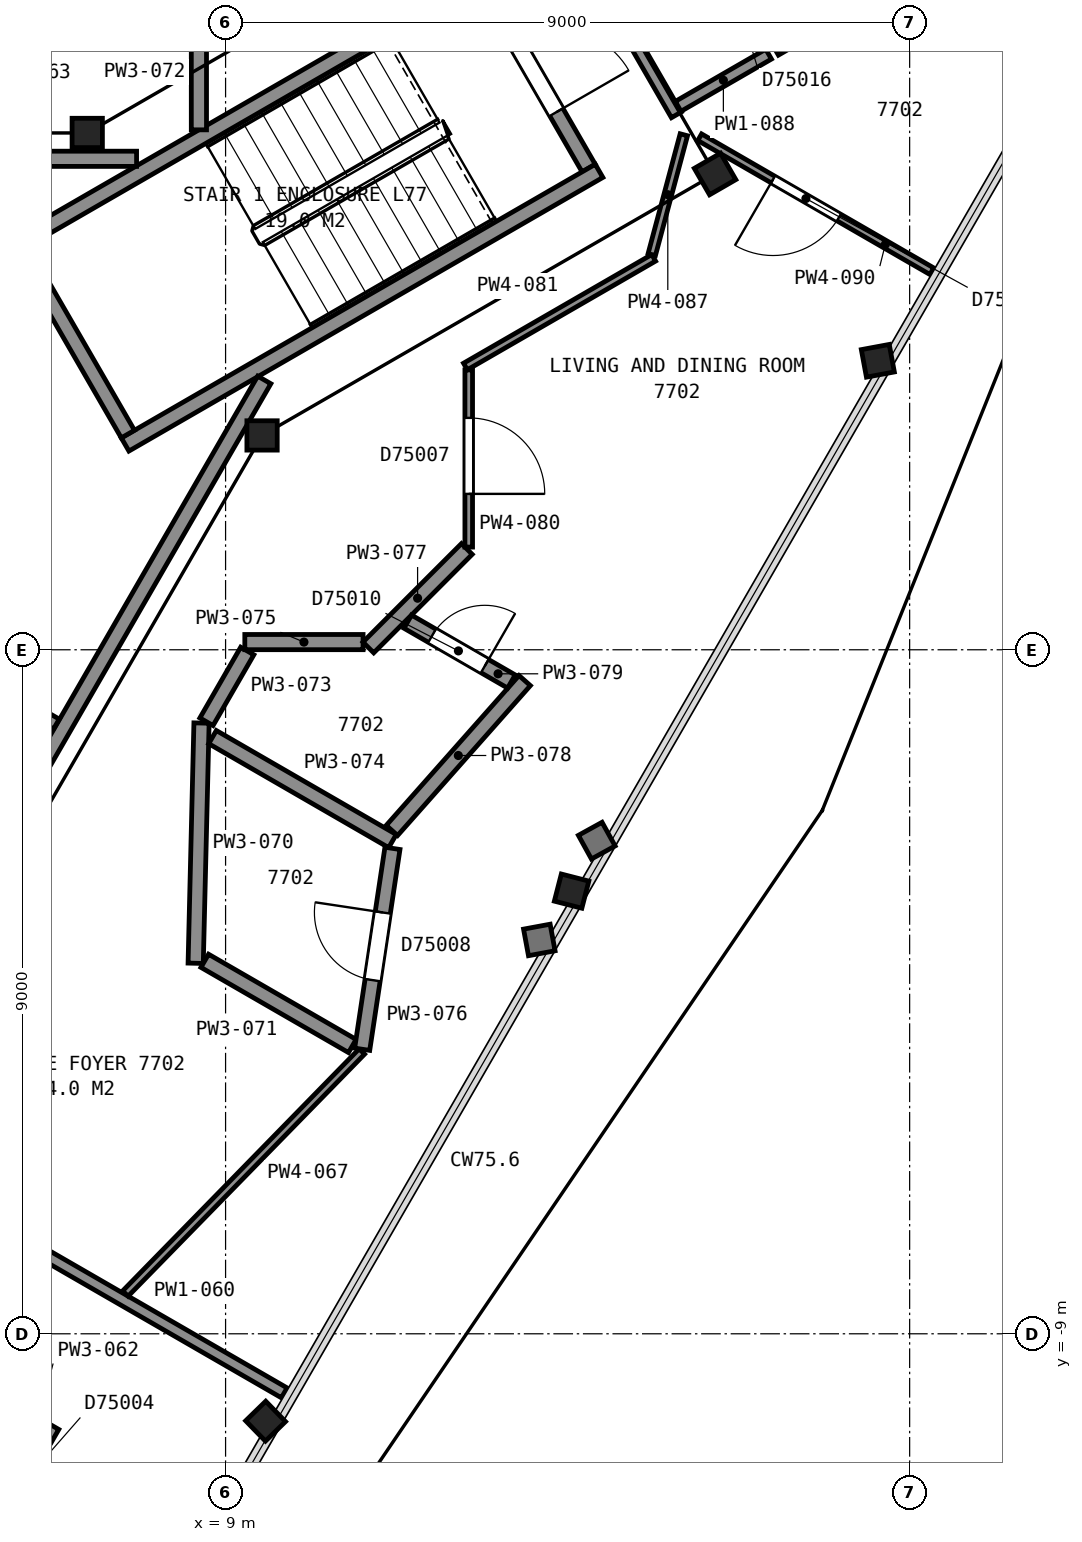
"""IFC4 building model, lengths in metres.
Left out: names, types, materials, properties, quantities, classifications, styles, units other than length and angle.
Written with IfcOpenShell. Run it as: python <this file> out.ifc"""

import sys

from ifc_helpers import new_model, si_unit, direction, frame, frame_2d, origin, origin_2d, place, context, subcontext, project, spatial, rectangle, i_section, extrude, element, fill, save


model = new_model("IFC4")
c1 = context("Model", 3, precision=1e-05, world=origin(), true_north=direction((0.0, 1.0)))
c2 = subcontext(c1, "Body", "Model", "MODEL_VIEW")
j1 = project(units=[si_unit("LENGTHUNIT", "METRE"), si_unit("PLANEANGLEUNIT", "RADIAN")], contexts=[c1])
p1 = place(None, origin())
s1 = spatial("IfcSite", under=j1, at=p1, CompositionType="ELEMENT")
p2 = place(p1, origin())
s2 = spatial("IfcBuilding", under=s1, at=p2, CompositionType="ELEMENT")
p3 = place(p2, frame((0.0, 0.0, 304.7)))
s3 = spatial("IfcBuildingStorey", under=s2, at=p3, CompositionType="ELEMENT", Elevation=304.7)
p4 = place(p3, frame((9.751, -10.381, 0.045), z_axis=(-0.187414704281, 0.192691239229, 0.963195626518), x_axis=(-0.498724706912, -0.863448717299, 0.075696626808)))
e1 = element("IfcColumn", 1, at=p4, inside=s3, PredefinedType="COLUMN", context=c2, shape_type="SweptSolid", body=[
    extrude(i_section(OverallWidth=0.373, OverallDepth=0.368, WebThickness=0.015, FlangeThickness=0.024, FilletRadius=0.015, at=origin_2d()), origin(), (0.0, 0.0, 1.0), 3.748),
])
p5 = place(p3, frame((13.868, -3.257, 0.045), z_axis=(-0.262724220884, 0.067633911174, 0.96249760406), x_axis=(-0.498583237787, -0.86355528035, -0.075412417924)))
e2 = element("IfcColumn", 2, at=p5, inside=s3, PredefinedType="COLUMN", context=c2, shape_type="SweptSolid", body=[
    extrude(i_section(OverallWidth=0.373, OverallDepth=0.368, WebThickness=0.015, FlangeThickness=0.024, FilletRadius=0.015, at=origin_2d()), origin(), (0.0, 0.0, 1.0), 3.75),
])
p6 = place(p3, frame((17.981, 3.876, 0.055), z_axis=(-0.328547208417, -0.061145929932, 0.942506184115), x_axis=(-0.48718313333, -0.843929861769, -0.224577343052)))
e3 = element("IfcColumn", 3, at=p6, inside=s3, PredefinedType="COLUMN", context=c2, shape_type="SweptSolid", body=[
    extrude(i_section(OverallWidth=0.373, OverallDepth=0.368, WebThickness=0.015, FlangeThickness=0.024, FilletRadius=0.015, at=origin_2d()), origin(), (0.0, 0.0, 1.0), 3.809),
])
p7 = place(p3, frame((9.48, 2.82, 0.0), z_axis=(0.0, 0.0, 1.0), x_axis=(1.0, 0.0, 0.0)))
e4 = element("IfcColumn", 4, at=p7, inside=s3, PredefinedType="COLUMN", context=c2, shape_type="SweptSolid", body=[
    extrude(i_section(OverallWidth=0.399, OverallDepth=0.386, WebThickness=0.021, FlangeThickness=0.033, FilletRadius=0.015, at=origin_2d()), origin(), (0.0, 0.0, 1.0), 3.7),
])
p8 = place(p3, frame((15.44, 6.26, 0.0), z_axis=(0.0, 0.0, 1.0), x_axis=(0.5, -0.866025403784, 0.0)))
e5 = element("IfcColumn", 5, at=p8, inside=s3, PredefinedType="COLUMN", context=c2, shape_type="SweptSolid", body=[
    extrude(i_section(OverallWidth=0.401, OverallDepth=0.399, WebThickness=0.025, FlangeThickness=0.04, FilletRadius=0.015, at=origin_2d()), origin(), (0.0, 0.0, 1.0), 3.7),
])
p9 = place(p3, frame((7.18, 6.8, 0.0), z_axis=(0.0, 0.0, 1.0), x_axis=(1.0, 0.0, 0.0)))
e6 = element("IfcColumn", 6, at=p9, inside=s3, PredefinedType="COLUMN", context=c2, shape_type="SweptSolid", body=[
    extrude(i_section(OverallWidth=0.399, OverallDepth=0.386, WebThickness=0.021, FlangeThickness=0.033, FilletRadius=0.015, at=origin_2d()), origin(), (0.0, 0.0, 1.0), 3.7),
])
p10 = place(p3, frame((13.777, 6.338, 0.0), z_axis=(0.0, 0.0, 1.0), x_axis=(-0.500049511043, 0.865996816683, 0.0)))
e7 = element("IfcWall", 7, at=p10, inside=s3, PredefinedType="PARTITIONING", context=c2, shape_type="SweptSolid", body=[
    extrude(rectangle(XDim=2.8, YDim=0.2, at=frame_2d((1.4, 0.0))), origin(), (0.0, 0.0, 1.0), 3.45),
])
p11 = place(p10, frame((0.85, 0.0, 0.0)))
e8 = element("IfcOpeningElement", 8, at=p11, cuts=e7, PredefinedType="OPENING", context=c2, shape_type="SweptSolid", body=[
    extrude(rectangle(XDim=1.1, YDim=2.1, at=frame_2d((0.55, 1.05))), frame((0.0, 0.11, 0.0), z_axis=(0.0, -1.0, 0.0), x_axis=(1.0, 0.0, 0.0)), (0.0, 0.0, 1.0), 0.22),
])
for number, where, z_axis, x_axis in (
    (9, (6.178, 5.299, 0.0), (0.0, 0.0, 1.0), (0.866, 0.5, 0.0)),
    (10, (7.678, 2.701, 0.0), (0.0, 0.0, 1.0), (0.866, 0.5, 0.0)),
):
    element("IfcWall", number, at=place(p3, frame(where, z_axis=z_axis, x_axis=x_axis)), inside=s3, PredefinedType="PARTITIONING", context=c2, shape_type="SweptSolid", body=[
        extrude(rectangle(XDim=7.2, YDim=0.2, at=frame_2d((3.6, 0.0))), origin(), (0.0, 0.0, 1.0), 3.45),
    ])
p12 = place(p3, frame((7.715, 2.838, 0.0), z_axis=(0.0, 0.0, 1.0), x_axis=(-0.500049511043, 0.865996816683, 0.0)))
e11 = element("IfcWall", 11, at=p12, inside=s3, PredefinedType="PARTITIONING", context=c2, shape_type="SweptSolid", body=[
    extrude(rectangle(XDim=2.8, YDim=0.2, at=frame_2d((1.4, 0.0))), origin(), (0.0, 0.0, 1.0), 3.45),
])
p13 = place(p3, frame((7.829, 6.46, 0.0), z_axis=(0.0, 0.0, 1.0), x_axis=(-1.0, 0.0, 0.0)))
e12 = element("IfcWall", 12, at=p13, inside=s3, PredefinedType="PARTITIONING", context=c2, shape_type="SweptSolid", body=[
    extrude(rectangle(XDim=15.658, YDim=0.2, at=frame_2d((7.829, 0.0))), origin(), (0.0, 0.0, 1.0), 3.45),
])
p14 = place(p13, frame((12.168, 0.0, 0.0)))
e13 = element("IfcOpeningElement", 13, at=p14, cuts=e12, PredefinedType="OPENING", context=c2, shape_type="SweptSolid", body=[
    extrude(rectangle(XDim=1.2, YDim=2.1, at=frame_2d((0.6, 1.05))), frame((0.0, 0.11, 0.0), z_axis=(0.0, -1.0, 0.0), x_axis=(1.0, 0.0, 0.0)), (0.0, 0.0, 1.0), 0.22),
])
p15 = place(p3, frame((3.828, -6.29, 0.0), z_axis=(0.0, 0.0, 1.0), x_axis=(0.499979739078, 0.866037101117, 0.0)))
e14 = element("IfcWall", 14, at=p15, inside=s3, PredefinedType="PARTITIONING", context=c2, shape_type="SweptSolid", body=[
    extrude(rectangle(XDim=11.363, YDim=0.2, at=frame_2d((5.681, 0.0))), origin(), (0.0, 0.0, 1.0), 3.45),
])
p16 = place(p15, frame((0.55, 0.0, 0.0)))
e15 = element("IfcOpeningElement", 15, at=p16, cuts=e14, PredefinedType="OPENING", context=c2, shape_type="SweptSolid", body=[
    extrude(rectangle(XDim=1.2, YDim=2.1, at=frame_2d((0.6, 1.05))), frame((0.0, 0.11, 0.0), z_axis=(0.0, -1.0, 0.0), x_axis=(1.0, 0.0, 0.0)), (0.0, 0.0, 1.0), 0.22),
])
p17 = place(p3, frame((6.774, -0.978, 0.0), z_axis=(0.0, 0.0, 1.0), x_axis=(-0.866062920605, 0.499935013329, 0.0)))
e16 = element("IfcWall", 16, at=p17, inside=s3, PredefinedType="PARTITIONING", context=c2, shape_type="SweptSolid", body=[
    extrude(rectangle(XDim=2.22, YDim=0.15, at=frame_2d((1.11, 0.0))), origin(), (0.0, 0.0, 1.0), 3.45),
])
p18 = place(p17, frame((0.646, 0.0, 0.0)))
e17 = element("IfcOpeningElement", 17, at=p18, cuts=e16, PredefinedType="OPENING", context=c2, shape_type="SweptSolid", body=[
    extrude(rectangle(XDim=0.9, YDim=2.1, at=frame_2d((0.45, 1.05))), frame((0.0, 0.085, 0.0), z_axis=(0.0, -1.0, 0.0), x_axis=(1.0, 0.0, 0.0)), (0.0, 0.0, 1.0), 0.17),
])
p19 = place(p3, frame((3.682, -8.571, 0.0), z_axis=(0.0, 0.0, 1.0), x_axis=(0.866075604562, -0.499913039621, 0.0)))
e18 = element("IfcWall", 18, at=p19, inside=s3, PredefinedType="PARTITIONING", context=c2, shape_type="SweptSolid", body=[
    extrude(rectangle(XDim=3.549, YDim=0.2, at=frame_2d((1.774, 0.0))), origin(), (0.0, 0.0, 1.0), 2.723),
])
p20 = place(p3, frame((9.772, -9.777, 0.0), z_axis=(0.0, 0.0, 1.0), x_axis=(-0.866083818164, 0.499898809675, 0.0)))
e19 = element("IfcWall", 19, at=p20, inside=s3, PredefinedType="PARTITIONING", context=c2, shape_type="SweptSolid", body=[
    extrude(rectangle(XDim=6.551, YDim=0.15, at=frame_2d((3.275, 0.0))), origin(), (0.0, 0.0, 1.0), 2.723),
])
p21 = place(p20, frame((4.001, 0.0, 0.0)))
e20 = element("IfcOpeningElement", 20, at=p21, cuts=e19, PredefinedType="OPENING", context=c2, shape_type="SweptSolid", body=[
    extrude(rectangle(XDim=1.0, YDim=2.1, at=frame_2d((0.5, 1.05))), frame((0.0, 0.085, 0.0), z_axis=(0.0, -1.0, 0.0), x_axis=(1.0, 0.0, 0.0)), (0.0, 0.0, 1.0), 0.17),
])
p22 = place(p3, frame((7.682, -8.47, 0.0), z_axis=(0.0, 0.0, 1.0), x_axis=(0.698777378461, 0.715339203002, 0.0)))
e21 = element("IfcWall", 21, at=p22, inside=s3, PredefinedType="PARTITIONING", context=c2, shape_type="SweptSolid", body=[
    extrude(rectangle(XDim=4.452, YDim=0.1, at=frame_2d((2.226, 0.0))), origin(), (0.0, 0.0, 1.0), 2.723),
])
p23 = place(p3, frame((8.607, -4.125, 0.0), z_axis=(0.0, 0.0, 1.0), x_axis=(0.024245593124, 0.999706032399, 0.0)))
e22 = element("IfcWall", 22, at=p23, inside=s3, PredefinedType="PARTITIONING", context=c2, shape_type="SweptSolid", body=[
    extrude(rectangle(XDim=3.162, YDim=0.2, at=frame_2d((1.581, 0.0))), origin(), (0.0, 0.0, 1.0), 2.723),
])
p24 = place(p3, frame((8.726, -4.093, 0.0), z_axis=(0.0, 0.0, 1.0), x_axis=(0.866056839033, -0.499945548598, 0.0)))
e23 = element("IfcWall", 23, at=p24, inside=s3, PredefinedType="PARTITIONING", context=c2, shape_type="SweptSolid", body=[
    extrude(rectangle(XDim=2.242, YDim=0.2, at=frame_2d((1.121, 0.0))), origin(), (0.0, 0.0, 1.0), 2.723),
])
p25 = place(p3, frame((8.649, 6.841, 0.0), z_axis=(0.0, 0.0, 1.0), x_axis=(0.0, 1.0, 0.0)))
e24 = element("IfcWall", 24, at=p25, inside=s3, PredefinedType="PARTITIONING", context=c2, shape_type="SweptSolid", body=[
    extrude(rectangle(XDim=1.528, YDim=0.2, at=frame_2d((0.764, 0.0))), origin(), (0.0, 0.0, 1.0), 2.723),
])
p26 = place(p3, frame((8.749, -0.947, 0.0), z_axis=(0.0, 0.0, 1.0), x_axis=(0.499656913366, 0.866223394354, 0.0)))
e25 = element("IfcWall", 25, at=p26, inside=s3, PredefinedType="PARTITIONING", context=c2, shape_type="SweptSolid", body=[
    extrude(rectangle(XDim=1.075, YDim=0.2, at=frame_2d((0.538, 0.0))), origin(), (0.0, 0.0, 1.0), 2.723),
])
p27 = place(p3, frame((8.828, -1.149, 0.0), z_axis=(0.0, 0.0, 1.0), x_axis=(0.865853899269, -0.50029693695, 0.0)))
e26 = element("IfcWall", 26, at=p27, inside=s3, PredefinedType="PARTITIONING", context=c2, shape_type="SweptSolid", body=[
    extrude(rectangle(XDim=2.734, YDim=0.2, at=frame_2d((1.367, 0.0))), origin(), (0.0, 0.0, 1.0), 2.723),
])
p28 = place(p3, frame((9.253, 0.101, 0.0), z_axis=(0.0, 0.0, 1.0), x_axis=(1.0, 0.0, 0.0)))
e27 = element("IfcWall", 27, at=p28, inside=s3, PredefinedType="PARTITIONING", context=c2, shape_type="SweptSolid", body=[
    extrude(rectangle(XDim=1.556, YDim=0.2, at=frame_2d((0.778, 0.0))), origin(), (0.0, 0.0, 1.0), 2.723),
])
p29 = place(p3, frame((10.797, -5.256, 0.0), z_axis=(0.0, 0.0, 1.0), x_axis=(0.148961207986, 0.988843040384, 0.0)))
e28 = element("IfcWall", 28, at=p29, inside=s3, PredefinedType="PARTITIONING", context=c2, shape_type="SweptSolid", body=[
    extrude(rectangle(XDim=2.673, YDim=0.2, at=frame_2d((1.336, 0.0))), origin(), (0.0, 0.0, 1.0), 2.723),
])
p30 = place(p29, frame((0.92, 0.0, 0.0)))
e29 = element("IfcOpeningElement", 29, at=p30, cuts=e28, PredefinedType="OPENING", context=c2, shape_type="SweptSolid", body=[
    extrude(rectangle(XDim=0.9, YDim=2.1, at=frame_2d((0.45, 1.05))), frame((0.0, 0.11, 0.0), z_axis=(0.0, -1.0, 0.0), x_axis=(1.0, 0.0, 0.0)), (0.0, 0.0, 1.0), 0.22),
])
p31 = place(p3, frame((10.878, 0.03, 0.0), z_axis=(0.0, 0.0, 1.0), x_axis=(0.707173379423, 0.707040176677, 0.0)))
e30 = element("IfcWall", 30, at=p31, inside=s3, PredefinedType="PARTITIONING", context=c2, shape_type="SweptSolid", body=[
    extrude(rectangle(XDim=1.833, YDim=0.2, at=frame_2d((0.917, 0.0))), origin(), (0.0, 0.0, 1.0), 2.723),
])
p32 = place(p3, frame((11.188, -2.377, 0.0), z_axis=(0.0, 0.0, 1.0), x_axis=(0.663045631266, 0.748578981043, 0.0)))
e31 = element("IfcWall", 31, at=p32, inside=s3, PredefinedType="PARTITIONING", context=c2, shape_type="SweptSolid", body=[
    extrude(rectangle(XDim=2.635, YDim=0.2, at=frame_2d((1.317, 0.0))), origin(), (0.0, 0.0, 1.0), 2.723),
])
p33 = place(p3, frame((12.761, -0.417, 0.0), z_axis=(0.0, 0.0, 1.0), x_axis=(-0.866030680601, 0.499990860175, 0.0)))
e32 = element("IfcWall", 32, at=p33, inside=s3, PredefinedType="PARTITIONING", context=c2, shape_type="SweptSolid", body=[
    extrude(rectangle(XDim=1.575, YDim=0.2, at=frame_2d((0.787, 0.0))), origin(), (0.0, 0.0, 1.0), 2.723),
])
p34 = place(p33, frame((0.405, 0.0, 0.0)))
e33 = element("IfcOpeningElement", 33, at=p34, cuts=e32, PredefinedType="OPENING", context=c2, shape_type="SweptSolid", body=[
    extrude(rectangle(XDim=0.8, YDim=2.1, at=frame_2d((0.4, 1.05))), frame((0.0, 0.11, 0.0), z_axis=(0.0, -1.0, 0.0), x_axis=(1.0, 0.0, 0.0)), (0.0, 0.0, 1.0), 0.22),
])
p35 = place(p3, frame((12.199, 3.682, 0.0), z_axis=(0.0, 0.0, 1.0), x_axis=(0.0, -1.0, 0.0)))
e34 = element("IfcWall", 34, at=p35, inside=s3, PredefinedType="PARTITIONING", context=c2, shape_type="SweptSolid", body=[
    extrude(rectangle(XDim=2.331, YDim=0.1, at=frame_2d((1.166, 0.0))), origin(), (0.0, 0.0, 1.0), 2.723),
])
p36 = place(p35, frame((0.631, 0.0, 0.0)))
e35 = element("IfcOpeningElement", 35, at=p36, cuts=e34, PredefinedType="OPENING", context=c2, shape_type="SweptSolid", body=[
    extrude(rectangle(XDim=1.0, YDim=2.1, at=frame_2d((0.5, 1.05))), frame((0.0, 0.06, 0.0), z_axis=(0.0, -1.0, 0.0), x_axis=(1.0, 0.0, 0.0)), (0.0, 0.0, 1.0), 0.12),
])
p37 = place(p3, frame((12.156, 3.727, 0.0), z_axis=(0.0, 0.0, 1.0), x_axis=(0.866012137121, 0.500022977831, 0.0)))
e36 = element("IfcWall", 36, at=p37, inside=s3, PredefinedType="PARTITIONING", context=c2, shape_type="SweptSolid", body=[
    extrude(rectangle(XDim=2.86, YDim=0.1, at=frame_2d((1.43, 0.0))), origin(), (0.0, 0.0, 1.0), 2.723),
])
p38 = place(p3, frame((13.759, 9.069, 0.0), z_axis=(0.0, 0.0, 1.0), x_axis=(0.500046885369, -0.865998332812, 0.0)))
e37 = element("IfcWall", 37, at=p38, inside=s3, PredefinedType="PARTITIONING", context=c2, shape_type="SweptSolid", body=[
    extrude(rectangle(XDim=2.345, YDim=0.15, at=frame_2d((1.172, 0.0))), origin(), (0.0, 0.0, 1.0), 2.723),
])
p39 = place(p3, frame((14.607, 5.2, 0.0), z_axis=(0.0, 0.0, 1.0), x_axis=(0.258519214507, 0.966006115783, 0.0)))
e38 = element("IfcWall", 38, at=p39, inside=s3, PredefinedType="PARTITIONING", context=c2, shape_type="SweptSolid", body=[
    extrude(rectangle(XDim=1.632, YDim=0.1, at=frame_2d((0.816, 0.0))), origin(), (0.0, 0.0, 1.0), 2.723),
])
p40 = place(p3, frame((14.954, 7.149, 0.0), z_axis=(0.0, 0.0, 1.0), x_axis=(0.865960792519, 0.5001118933, 0.0)))
e39 = element("IfcWall", 39, at=p40, inside=s3, PredefinedType="PARTITIONING", context=c2, shape_type="SweptSolid", body=[
    extrude(rectangle(XDim=1.375, YDim=0.15, at=frame_2d((0.688, 0.0))), origin(), (0.0, 0.0, 1.0), 2.723),
])
p41 = place(p3, frame((15.238, 6.744, 0.0), z_axis=(0.0, 0.0, 1.0), x_axis=(0.866104892567, -0.49986229611, 0.0)))
e40 = element("IfcWall", 40, at=p41, inside=s3, PredefinedType="PARTITIONING", context=c2, shape_type="SweptSolid", body=[
    extrude(rectangle(XDim=3.526, YDim=0.1, at=frame_2d((1.763, 0.0))), origin(), (0.0, 0.0, 1.0), 2.723),
])
p42 = place(p41, frame((1.114, 0.0, 0.0)))
e41 = element("IfcOpeningElement", 41, at=p42, cuts=e40, PredefinedType="OPENING", context=c2, shape_type="SweptSolid", body=[
    extrude(rectangle(XDim=1.0, YDim=2.1, at=frame_2d((0.5, 1.05))), frame((0.0, 0.06, 0.0), z_axis=(0.0, -1.0, 0.0), x_axis=(1.0, 0.0, 0.0)), (0.0, 0.0, 1.0), 0.12),
])
p43 = place(p3, frame((16.236, 7.889, 0.0), z_axis=(0.0, 0.0, 1.0), x_axis=(0.865995456094, 0.500051867335, 0.0)))
e42 = element("IfcWall", 42, at=p43, inside=s3, PredefinedType="PARTITIONING", context=c2, shape_type="SweptSolid", body=[
    extrude(rectangle(XDim=6.415, YDim=0.15, at=frame_2d((3.208, 0.0))), origin(), (0.0, 0.0, 1.0), 2.723),
])
p44 = place(p11, origin())
e43 = element("IfcDoor", 43, at=p44, inside=s3, OperationType="SINGLE_SWING_LEFT", PredefinedType="DOOR", context=c2, shape_type="SweptSolid", body=[
    extrude(rectangle(XDim=1.1, YDim=2.1, at=frame_2d((0.55, 1.05))), frame((0.0, 0.025, 0.0), z_axis=(0.0, -1.0, 0.0), x_axis=(1.0, 0.0, 0.0)), (0.0, 0.0, 1.0), 0.05),
])
fill(e8, e43)
p45 = place(p30, origin())
e44 = element("IfcDoor", 44, at=p45, inside=s3, OperationType="SINGLE_SWING_RIGHT", PredefinedType="DOOR", context=c2, shape_type="SweptSolid", body=[
    extrude(rectangle(XDim=0.9, YDim=2.1, at=frame_2d((0.45, 1.05))), frame((0.0, 0.025, 0.0), z_axis=(0.0, -1.0, 0.0), x_axis=(1.0, 0.0, 0.0)), (0.0, 0.0, 1.0), 0.05),
])
fill(e29, e44)
p46 = place(p34, origin())
e45 = element("IfcDoor", 45, at=p46, inside=s3, OperationType="SINGLE_SWING_LEFT", PredefinedType="DOOR", context=c2, shape_type="SweptSolid", body=[
    extrude(rectangle(XDim=0.8, YDim=2.1, at=frame_2d((0.4, 1.05))), frame((0.0, 0.025, 0.0), z_axis=(0.0, -1.0, 0.0), x_axis=(1.0, 0.0, 0.0)), (0.0, 0.0, 1.0), 0.05),
])
fill(e33, e45)
p47 = place(p36, origin())
e46 = element("IfcDoor", 46, at=p47, inside=s3, OperationType="SINGLE_SWING_RIGHT", PredefinedType="DOOR", context=c2, shape_type="SweptSolid", body=[
    extrude(rectangle(XDim=1.0, YDim=2.1, at=frame_2d((0.5, 1.05))), frame((0.0, 0.025, 0.0), z_axis=(0.0, -1.0, 0.0), x_axis=(1.0, 0.0, 0.0)), (0.0, 0.0, 1.0), 0.05),
])
fill(e35, e46)
p48 = place(p42, origin())
e47 = element("IfcDoor", 47, at=p48, inside=s3, OperationType="SINGLE_SWING_LEFT", PredefinedType="DOOR", context=c2, shape_type="SweptSolid", body=[
    extrude(rectangle(XDim=1.0, YDim=2.1, at=frame_2d((0.5, 1.05))), frame((0.0, 0.025, 0.0), z_axis=(0.0, -1.0, 0.0), x_axis=(1.0, 0.0, 0.0)), (0.0, 0.0, 1.0), 0.05),
])
fill(e41, e47)
save(model, sys.argv[1])
